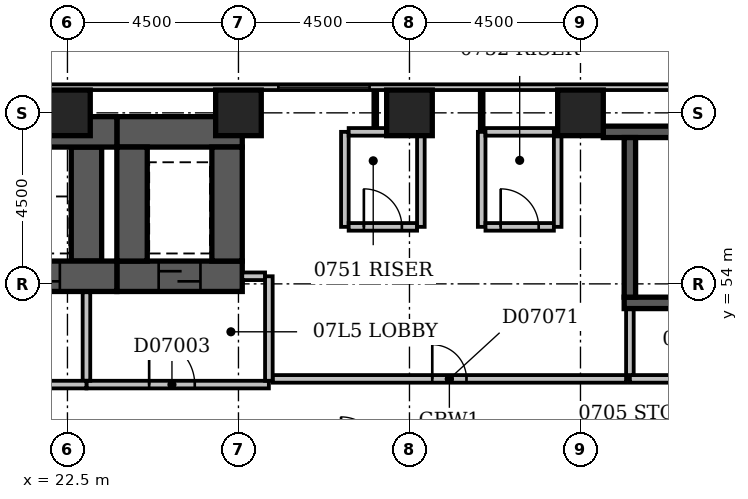
"""IFC4 building model, lengths in metres.
Left out: names, types, materials, properties, quantities, classifications, styles, units other than length and angle.
Written with IfcOpenShell. Run it as: python <this file> out.ifc"""

import sys

from ifc_helpers import new_model, si_unit, direction, frame, frame_2d, origin, origin_2d, place, context, subcontext, project, spatial, rectangle, extrude, element, fill, save


model = new_model("IFC4")
c1 = context("Model", 3, precision=1e-05, world=origin(), true_north=direction((0.0, 1.0)))
c2 = subcontext(c1, "Body", "Model", "MODEL_VIEW")
j1 = project(units=[si_unit("LENGTHUNIT", "METRE"), si_unit("PLANEANGLEUNIT", "RADIAN")], contexts=[c1])
p1 = place(None, origin())
s1 = spatial("IfcSite", under=j1, at=p1, CompositionType="ELEMENT")
p2 = place(p1, origin())
s2 = spatial("IfcBuilding", under=s1, at=p2, CompositionType="ELEMENT")
p3 = place(p2, frame((0.0, 0.0, 36.2)))
s3 = spatial("IfcBuildingStorey", under=s2, at=p3, CompositionType="ELEMENT", Elevation=36.2)
p4 = place(p3, frame((7.35, 54.2, -0.3), z_axis=(0.0, 0.0, 1.0), x_axis=(1.0, 0.0, 0.0)))
e1 = element("IfcWall", 1, at=p4, inside=s3, PredefinedType="SHEAR", context=c2, shape_type="SweptSolid", body=[
    extrude(rectangle(XDim=16.45, YDim=0.8, at=frame_2d((8.225, 0.0))), origin(), (0.0, 0.0, 1.0), 3.6),
])
p5 = place(p4, frame((1.35, 0.0, 0.3)))
e2 = element("IfcOpeningElement", 2, at=p5, cuts=e1, PredefinedType="OPENING", context=c2, shape_type="SweptSolid", body=[
    extrude(rectangle(XDim=1.1, YDim=2.1, at=frame_2d((0.55, 1.05))), frame((0.0, 0.412, 0.0), z_axis=(0.0, -1.0, 0.0), x_axis=(1.0, 0.0, 0.0)), (0.0, 0.0, 1.0), 0.824),
])
p6 = place(p4, frame((3.85, 0.0, 0.3)))
e3 = element("IfcOpeningElement", 3, at=p6, cuts=e1, PredefinedType="OPENING", context=c2, shape_type="SweptSolid", body=[
    extrude(rectangle(XDim=1.1, YDim=2.1, at=frame_2d((0.55, 1.05))), frame((0.0, 0.412, 0.0), z_axis=(0.0, -1.0, 0.0), x_axis=(1.0, 0.0, 0.0)), (0.0, 0.0, 1.0), 0.824),
])
p7 = place(p4, frame((6.35, 0.0, 0.3)))
e4 = element("IfcOpeningElement", 4, at=p7, cuts=e1, PredefinedType="OPENING", context=c2, shape_type="SweptSolid", body=[
    extrude(rectangle(XDim=1.1, YDim=2.1, at=frame_2d((0.55, 1.05))), frame((0.0, 0.412, 0.0), z_axis=(0.0, -1.0, 0.0), x_axis=(1.0, 0.0, 0.0)), (0.0, 0.0, 1.0), 0.824),
])
p8 = place(p4, frame((8.85, 0.0, 0.3)))
e5 = element("IfcOpeningElement", 5, at=p8, cuts=e1, PredefinedType="OPENING", context=c2, shape_type="SweptSolid", body=[
    extrude(rectangle(XDim=1.1, YDim=2.1, at=frame_2d((0.55, 1.05))), frame((0.0, 0.412, 0.0), z_axis=(0.0, -1.0, 0.0), x_axis=(1.0, 0.0, 0.0)), (0.0, 0.0, 1.0), 0.824),
])
p9 = place(p4, frame((11.35, 0.0, 0.3)))
e6 = element("IfcOpeningElement", 6, at=p9, cuts=e1, PredefinedType="OPENING", context=c2, shape_type="SweptSolid", body=[
    extrude(rectangle(XDim=1.1, YDim=2.1, at=frame_2d((0.55, 1.05))), frame((0.0, 0.412, 0.0), z_axis=(0.0, -1.0, 0.0), x_axis=(1.0, 0.0, 0.0)), (0.0, 0.0, 1.0), 0.824),
])
p10 = place(p4, frame((13.85, 0.0, 0.3)))
e7 = element("IfcOpeningElement", 7, at=p10, cuts=e1, PredefinedType="OPENING", context=c2, shape_type="SweptSolid", body=[
    extrude(rectangle(XDim=1.1, YDim=2.1, at=frame_2d((0.55, 1.05))), frame((0.0, 0.412, 0.0), z_axis=(0.0, -1.0, 0.0), x_axis=(1.0, 0.0, 0.0)), (0.0, 0.0, 1.0), 0.824),
])
p11 = place(p3, frame((7.35, 58.0, -0.3), z_axis=(0.0, 0.0, 1.0), x_axis=(1.0, 0.0, 0.0)))
e8 = element("IfcWall", 8, at=p11, inside=s3, PredefinedType="SHEAR", context=c2, shape_type="SweptSolid", body=[
    extrude(rectangle(XDim=16.45, YDim=0.8, at=frame_2d((8.225, 0.0))), origin(), (0.0, 0.0, 1.0), 3.6),
])
p12 = place(p3, frame((23.0, 54.6, -0.3), z_axis=(0.0, 0.0, 1.0), x_axis=(0.0, 1.0, 0.0)))
e9 = element("IfcWall", 9, at=p12, inside=s3, PredefinedType="SHEAR", context=c2, shape_type="SweptSolid", body=[
    extrude(rectangle(XDim=3.0, YDim=0.8, at=frame_2d((1.5, 0.0))), origin(), (0.0, 0.0, 1.0), 3.6),
])
p13 = place(p3, frame((23.8, 54.2, -0.3), z_axis=(0.0, 0.0, 1.0), x_axis=(1.0, 0.0, 0.0)))
e10 = element("IfcWall", 10, at=p13, inside=s3, PredefinedType="SHEAR", context=c2, shape_type="SweptSolid", body=[
    extrude(rectangle(XDim=3.3, YDim=0.8, at=frame_2d((1.65, 0.0))), origin(), (0.0, 0.0, 1.0), 3.6),
])
p14 = place(p13, frame((1.1, 0.0, 0.3)))
e11 = element("IfcOpeningElement", 11, at=p14, cuts=e10, PredefinedType="OPENING", context=c2, shape_type="SweptSolid", body=[
    extrude(rectangle(XDim=1.1, YDim=2.1, at=frame_2d((0.55, 1.05))), frame((0.0, 0.412, 0.0), z_axis=(0.0, -1.0, 0.0), x_axis=(1.0, 0.0, 0.0)), (0.0, 0.0, 1.0), 0.824),
])
p15 = place(p3, frame((23.8, 58.0, -0.3), z_axis=(0.0, 0.0, 1.0), x_axis=(1.0, 0.0, 0.0)))
e12 = element("IfcWall", 12, at=p15, inside=s3, PredefinedType="SHEAR", context=c2, shape_type="SweptSolid", body=[
    extrude(rectangle(XDim=3.3, YDim=0.8, at=frame_2d((1.65, 0.0))), origin(), (0.0, 0.0, 1.0), 3.6),
])
for number, where, z_axis, x_axis in (
    (13, (24.2, 54.6, -0.3), (0.0, 0.0, 1.0), (0.0, 1.0, 0.0)),
    (14, (26.7, 54.6, -0.3), (0.0, 0.0, 1.0), (0.0, 1.0, 0.0)),
):
    element("IfcWall", number, at=place(p3, frame(where, z_axis=z_axis, x_axis=x_axis)), inside=s3, PredefinedType="SHEAR", context=c2, shape_type="SweptSolid", body=[
        extrude(rectangle(XDim=3.0, YDim=0.8, at=frame_2d((1.5, 0.0))), origin(), (0.0, 0.0, 1.0), 3.6),
    ])
p16 = place(p3, frame((36.6, 58.0, -0.3), z_axis=(0.0, 0.0, 1.0), x_axis=(1.0, 0.0, 0.0)))
e15 = element("IfcWall", 15, at=p16, inside=s3, PredefinedType="SHEAR", context=c2, shape_type="SweptSolid", body=[
    extrude(rectangle(XDim=7.8, YDim=0.3, at=frame_2d((3.9, 0.0))), origin(), (0.0, 0.0, 1.0), 3.6),
])
p17 = place(p3, frame((37.15, 53.5, -0.3), z_axis=(0.0, 0.0, 1.0), x_axis=(1.0, 0.0, 0.0)))
e16 = element("IfcWall", 16, at=p17, inside=s3, PredefinedType="SHEAR", context=c2, shape_type="SweptSolid", body=[
    extrude(rectangle(XDim=7.0, YDim=0.3, at=frame_2d((3.5, 0.0))), origin(), (0.0, 0.0, 1.0), 3.6),
])
p18 = place(p17, frame((5.58, 0.0, 0.3)))
e17 = element("IfcOpeningElement", 17, at=p18, cuts=e16, PredefinedType="OPENING", context=c2, shape_type="SweptSolid", body=[
    extrude(rectangle(XDim=1.1, YDim=2.1, at=frame_2d((0.55, 1.05))), frame((0.0, 0.162, 0.0), z_axis=(0.0, -1.0, 0.0), x_axis=(1.0, 0.0, 0.0)), (0.0, 0.0, 1.0), 0.324),
])
p19 = place(p3, frame((37.3, 53.65, -0.3), z_axis=(0.0, 0.0, 1.0), x_axis=(0.0, 1.0, 0.0)))
e18 = element("IfcWall", 18, at=p19, inside=s3, PredefinedType="SHEAR", context=c2, shape_type="SweptSolid", body=[
    extrude(rectangle(XDim=4.2, YDim=0.3, at=frame_2d((2.1, 0.0))), origin(), (0.0, 0.0, 1.0), 3.6),
])
for number, where, z_axis, x_axis in (
    (19, (22.5, 58.5, -0.3), (0.0, 0.0, 1.0), (1.0, 0.0, 0.0)),
    (20, (27.0, 58.5, -0.3), (0.0, 0.0, 1.0), (1.0, 0.0, 0.0)),
    (21, (31.5, 58.5, -0.3), (0.0, 0.0, 1.0), (1.0, 0.0, 0.0)),
    (22, (36.0, 58.5, -0.3), (0.0, 0.0, 1.0), (1.0, 0.0, 0.0)),
):
    element("IfcColumn", number, at=place(p3, frame(where, z_axis=z_axis, x_axis=x_axis)), inside=s3, PredefinedType="COLUMN", context=c2, shape_type="SweptSolid", body=[
        extrude(rectangle(XDim=1.2, YDim=1.2, at=origin_2d()), origin(), (0.0, 0.0, 1.0), 3.6),
    ])
p20 = place(p3, frame((68.1, 59.175, 0.0), z_axis=(0.0, 0.0, 1.0), x_axis=(-1.0, 0.0, 0.0)))
e23 = element("IfcWall", 23, at=p20, inside=s3, PredefinedType="STANDARD", context=c2, shape_type="SweptSolid", body=[
    extrude(rectangle(XDim=68.85, YDim=0.15, at=frame_2d((34.425, 0.0))), origin(), (0.0, 0.0, 1.0), 2.7),
])
p21 = place(p20, frame((1.65, 0.0, 0.6)))
e24 = element("IfcOpeningElement", 24, at=p21, cuts=e23, PredefinedType="OPENING", context=c2, shape_type="SweptSolid", body=[
    extrude(rectangle(XDim=2.4, YDim=1.8, at=frame_2d((1.2, 0.9))), frame((0.0, 0.087, 0.0), z_axis=(0.0, -1.0, 0.0), x_axis=(1.0, 0.0, 0.0)), (0.0, 0.0, 1.0), 0.174),
])
p22 = place(p20, frame((6.023, 0.0, 0.6)))
e25 = element("IfcOpeningElement", 25, at=p22, cuts=e23, PredefinedType="OPENING", context=c2, shape_type="SweptSolid", body=[
    extrude(rectangle(XDim=1.2, YDim=1.8, at=frame_2d((0.6, 0.9))), frame((0.0, 0.087, 0.0), z_axis=(0.0, -1.0, 0.0), x_axis=(1.0, 0.0, 0.0)), (0.0, 0.0, 1.0), 0.174),
])
p23 = place(p20, frame((37.65, 0.0, 0.6)))
e26 = element("IfcOpeningElement", 26, at=p23, cuts=e23, PredefinedType="OPENING", context=c2, shape_type="SweptSolid", body=[
    extrude(rectangle(XDim=2.4, YDim=1.8, at=frame_2d((1.2, 0.9))), frame((0.0, 0.087, 0.0), z_axis=(0.0, -1.0, 0.0), x_axis=(1.0, 0.0, 0.0)), (0.0, 0.0, 1.0), 0.174),
])
p24 = place(p3, frame((8.0, 51.35, 0.0), z_axis=(0.0, 0.0, 1.0), x_axis=(1.0, 0.0, 0.0)))
e27 = element("IfcWall", 27, at=p24, inside=s3, PredefinedType="PARTITIONING", context=c2, shape_type="SweptSolid", body=[
    extrude(rectangle(XDim=15.0, YDim=0.2, at=frame_2d((7.5, 0.0))), origin(), (0.0, 0.0, 1.0), 3.3),
])
p25 = place(p24, frame((3.4, 0.0, 0.0)))
e28 = element("IfcOpeningElement", 28, at=p25, cuts=e27, PredefinedType="OPENING", context=c2, shape_type="SweptSolid", body=[
    extrude(rectangle(XDim=1.2, YDim=2.1, at=frame_2d((0.6, 1.05))), frame((0.0, 0.112, 0.0), z_axis=(0.0, -1.0, 0.0), x_axis=(1.0, 0.0, 0.0)), (0.0, 0.0, 1.0), 0.224),
])
p26 = place(p24, frame((9.4, 0.0, 0.0)))
e29 = element("IfcOpeningElement", 29, at=p26, cuts=e27, PredefinedType="OPENING", context=c2, shape_type="SweptSolid", body=[
    extrude(rectangle(XDim=1.2, YDim=2.1, at=frame_2d((0.6, 1.05))), frame((0.0, 0.112, 0.0), z_axis=(0.0, -1.0, 0.0), x_axis=(1.0, 0.0, 0.0)), (0.0, 0.0, 1.0), 0.224),
])
p27 = place(p3, frame((23.0, 51.45, 0.0), z_axis=(0.0, 0.0, 1.0), x_axis=(0.0, 1.0, 0.0)))
e30 = element("IfcWall", 30, at=p27, inside=s3, PredefinedType="PARTITIONING", context=c2, shape_type="SweptSolid", body=[
    extrude(rectangle(XDim=2.33, YDim=0.2, at=frame_2d((1.165, 0.0))), origin(), (0.0, 0.0, 1.0), 3.3),
])
p28 = place(p3, frame((23.0, 51.35, 0.0), z_axis=(0.0, 0.0, 1.0), x_axis=(1.0, 0.0, 0.0)))
e31 = element("IfcWall", 31, at=p28, inside=s3, PredefinedType="PARTITIONING", context=c2, shape_type="SweptSolid", body=[
    extrude(rectangle(XDim=4.8, YDim=0.2, at=frame_2d((2.4, 0.0))), origin(), (0.0, 0.0, 1.0), 3.3),
])
p29 = place(p28, frame((1.65, 0.0, 0.0)))
e32 = element("IfcOpeningElement", 32, at=p29, cuts=e31, PredefinedType="OPENING", context=c2, shape_type="SweptSolid", body=[
    extrude(rectangle(XDim=1.2, YDim=2.1, at=frame_2d((0.6, 1.05))), frame((0.0, 0.112, 0.0), z_axis=(0.0, -1.0, 0.0), x_axis=(1.0, 0.0, 0.0)), (0.0, 0.0, 1.0), 0.224),
])
p30 = place(p3, frame((27.8, 51.45, 0.0), z_axis=(0.0, 0.0, 1.0), x_axis=(0.0, 1.0, 0.0)))
e33 = element("IfcWall", 33, at=p30, inside=s3, PredefinedType="PARTITIONING", context=c2, shape_type="SweptSolid", body=[
    extrude(rectangle(XDim=2.75, YDim=0.2, at=frame_2d((1.375, 0.0))), origin(), (0.0, 0.0, 1.0), 3.3),
])
p31 = place(p3, frame((27.1, 54.2, 0.0), z_axis=(0.0, 0.0, 1.0), x_axis=(1.0, 0.0, 0.0)))
e34 = element("IfcWall", 34, at=p31, inside=s3, PredefinedType="PARTITIONING", context=c2, shape_type="SweptSolid", body=[
    extrude(rectangle(XDim=0.6, YDim=0.2, at=frame_2d((0.3, 0.0))), origin(), (0.0, 0.0, 1.0), 3.3),
])
p32 = place(p3, frame((37.3, 51.5, 0.0), z_axis=(0.0, 0.0, 1.0), x_axis=(1.0, 0.0, 0.0)))
e35 = element("IfcWall", 35, at=p32, inside=s3, PredefinedType="PARTITIONING", context=c2, shape_type="SweptSolid", body=[
    extrude(rectangle(XDim=6.7, YDim=0.2, at=frame_2d((3.35, 0.0))), origin(), (0.0, 0.0, 1.0), 3.3),
])
p33 = place(p32, frame((2.75, 0.0, 0.0)))
e36 = element("IfcOpeningElement", 36, at=p33, cuts=e35, PredefinedType="OPENING", context=c2, shape_type="SweptSolid", body=[
    extrude(rectangle(XDim=1.2, YDim=2.1, at=frame_2d((0.6, 1.05))), frame((0.0, 0.112, 0.0), z_axis=(0.0, -1.0, 0.0), x_axis=(1.0, 0.0, 0.0)), (0.0, 0.0, 1.0), 0.224),
])
p34 = place(p3, frame((37.3, 51.6, 0.0), z_axis=(0.0, 0.0, 1.0), x_axis=(0.0, 1.0, 0.0)))
e37 = element("IfcWall", 37, at=p34, inside=s3, PredefinedType="PARTITIONING", context=c2, shape_type="SweptSolid", body=[
    extrude(rectangle(XDim=1.73, YDim=0.2, at=frame_2d((0.865, 0.0))), origin(), (0.0, 0.0, 1.0), 3.3),
])
p35 = place(p3, frame((27.9, 51.5, 0.0), z_axis=(0.0, 0.0, 1.0), x_axis=(1.0, 0.0, 0.0)))
e38 = element("IfcWall", 38, at=p35, inside=s3, PredefinedType="PARTITIONING", context=c2, shape_type="SweptSolid", body=[
    extrude(rectangle(XDim=9.3, YDim=0.2, at=frame_2d((4.65, 0.0))), origin(), (0.0, 0.0, 1.0), 3.3),
])
p36 = place(p35, frame((4.2, 0.0, 0.0)))
e39 = element("IfcOpeningElement", 39, at=p36, cuts=e38, PredefinedType="OPENING", context=c2, shape_type="SweptSolid", body=[
    extrude(rectangle(XDim=0.9, YDim=2.1, at=frame_2d((0.45, 1.05))), frame((0.0, 0.112, 0.0), z_axis=(0.0, -1.0, 0.0), x_axis=(1.0, 0.0, 0.0)), (0.0, 0.0, 1.0), 0.224),
])
p37 = place(p3, frame((29.8, 55.5, 0.0), z_axis=(0.0, 0.0, 1.0), x_axis=(0.0, 1.0, 0.0)))
e40 = element("IfcWall", 40, at=p37, inside=s3, PredefinedType="PARTITIONING", context=c2, shape_type="SweptSolid", body=[
    extrude(rectangle(XDim=2.5, YDim=0.2, at=frame_2d((1.25, 0.0))), origin(), (0.0, 0.0, 1.0), 3.3),
])
p38 = place(p3, frame((29.9, 55.5, 0.0), z_axis=(0.0, 0.0, 1.0), x_axis=(1.0, 0.0, 0.0)))
e41 = element("IfcWall", 41, at=p38, inside=s3, PredefinedType="PARTITIONING", context=c2, shape_type="SweptSolid", body=[
    extrude(rectangle(XDim=1.8, YDim=0.2, at=frame_2d((0.9, 0.0))), origin(), (0.0, 0.0, 1.0), 3.3),
])
p39 = place(p38, frame((0.4, 0.0, 0.0)))
e42 = element("IfcOpeningElement", 42, at=p39, cuts=e41, PredefinedType="OPENING", context=c2, shape_type="SweptSolid", body=[
    extrude(rectangle(XDim=1.0, YDim=2.1, at=frame_2d((0.5, 1.05))), frame((0.0, 0.112, 0.0), z_axis=(0.0, -1.0, 0.0), x_axis=(1.0, 0.0, 0.0)), (0.0, 0.0, 1.0), 0.224),
])
for number, where, z_axis, x_axis in (
    (43, (31.8, 55.5, 0.0), (0.0, 0.0, 1.0), (0.0, 1.0, 0.0)),
    (44, (33.4, 55.5, 0.0), (0.0, 0.0, 1.0), (0.0, 1.0, 0.0)),
):
    element("IfcWall", number, at=place(p3, frame(where, z_axis=z_axis, x_axis=x_axis)), inside=s3, PredefinedType="PARTITIONING", context=c2, shape_type="SweptSolid", body=[
        extrude(rectangle(XDim=2.5, YDim=0.2, at=frame_2d((1.25, 0.0))), origin(), (0.0, 0.0, 1.0), 3.3),
    ])
p40 = place(p3, frame((33.5, 55.5, 0.0), z_axis=(0.0, 0.0, 1.0), x_axis=(1.0, 0.0, 0.0)))
e45 = element("IfcWall", 45, at=p40, inside=s3, PredefinedType="PARTITIONING", context=c2, shape_type="SweptSolid", body=[
    extrude(rectangle(XDim=1.8, YDim=0.2, at=frame_2d((0.9, 0.0))), origin(), (0.0, 0.0, 1.0), 3.3),
])
p41 = place(p40, frame((0.4, 0.0, 0.0)))
e46 = element("IfcOpeningElement", 46, at=p41, cuts=e45, PredefinedType="OPENING", context=c2, shape_type="SweptSolid", body=[
    extrude(rectangle(XDim=1.0, YDim=2.1, at=frame_2d((0.5, 1.05))), frame((0.0, 0.112, 0.0), z_axis=(0.0, -1.0, 0.0), x_axis=(1.0, 0.0, 0.0)), (0.0, 0.0, 1.0), 0.224),
])
p42 = place(p3, frame((35.4, 55.5, 0.0), z_axis=(0.0, 0.0, 1.0), x_axis=(0.0, 1.0, 0.0)))
e47 = element("IfcWall", 47, at=p42, inside=s3, PredefinedType="PARTITIONING", context=c2, shape_type="SweptSolid", body=[
    extrude(rectangle(XDim=2.5, YDim=0.2, at=frame_2d((1.25, 0.0))), origin(), (0.0, 0.0, 1.0), 2.4),
])
p43 = place(p3, frame((29.9, 58.0, 0.0), z_axis=(0.0, 0.0, 1.0), x_axis=(1.0, 0.0, 0.0)))
e48 = element("IfcWall", 48, at=p43, inside=s3, PredefinedType="PARTITIONING", context=c2, shape_type="SweptSolid", body=[
    extrude(rectangle(XDim=1.8, YDim=0.2, at=frame_2d((0.9, 0.0))), origin(), (0.0, 0.0, 1.0), 3.3),
])
p44 = place(p3, frame((33.4, 58.0, 0.0), z_axis=(0.0, 0.0, 1.0), x_axis=(0.0, 1.0, 0.0)))
e49 = element("IfcWall", 49, at=p44, inside=s3, PredefinedType="PARTITIONING", context=c2, shape_type="SweptSolid", body=[
    extrude(rectangle(XDim=1.1, YDim=0.1, at=frame_2d((0.55, 0.0))), origin(), (0.0, 0.0, 1.0), 3.3),
])
p45 = place(p3, frame((33.5, 58.0, 0.0), z_axis=(0.0, 0.0, 1.0), x_axis=(1.0, 0.0, 0.0)))
e50 = element("IfcWall", 50, at=p45, inside=s3, PredefinedType="PARTITIONING", context=c2, shape_type="SweptSolid", body=[
    extrude(rectangle(XDim=1.8, YDim=0.2, at=frame_2d((0.9, 0.0))), origin(), (0.0, 0.0, 1.0), 3.3),
])
p46 = place(p3, frame((30.6, 58.1, 0.0), z_axis=(0.0, 0.0, 1.0), x_axis=(0.0, 1.0, 0.0)))
e51 = element("IfcWall", 51, at=p46, inside=s3, PredefinedType="PARTITIONING", context=c2, shape_type="SweptSolid", body=[
    extrude(rectangle(XDim=1.0, YDim=0.1, at=frame_2d((0.5, 0.0))), origin(), (0.0, 0.0, 1.0), 3.3),
])
p47 = place(p23, origin())
e52 = element("IfcWindow", 52, at=p47, inside=s3, PartitioningType="SINGLE_PANEL", PredefinedType="WINDOW", context=c2, shape_type="SweptSolid", body=[
    extrude(rectangle(XDim=2.4, YDim=1.8, at=frame_2d((1.2, 0.9))), frame((0.0, 0.03, 0.0), z_axis=(0.0, -1.0, 0.0), x_axis=(1.0, 0.0, 0.0)), (0.0, 0.0, 1.0), 0.06),
])
fill(e26, e52)
p48 = place(p29, origin())
e53 = element("IfcDoor", 53, at=p48, inside=s3, OperationType="SINGLE_SWING_LEFT", PredefinedType="DOOR", context=c2, shape_type="SweptSolid", body=[
    extrude(rectangle(XDim=1.2, YDim=2.1, at=frame_2d((0.6, 1.05))), frame((0.0, 0.025, 0.0), z_axis=(0.0, -1.0, 0.0), x_axis=(1.0, 0.0, 0.0)), (0.0, 0.0, 1.0), 0.05),
])
fill(e32, e53)
p49 = place(p14, origin())
e54 = element("IfcDoor", 54, at=p49, inside=s3, OperationType="SLIDING_TO_LEFT", PredefinedType="DOOR", context=c2, shape_type="SweptSolid", body=[
    extrude(rectangle(XDim=1.1, YDim=2.1, at=frame_2d((0.55, 1.05))), frame((0.0, 0.025, 0.0), z_axis=(0.0, -1.0, 0.0), x_axis=(1.0, 0.0, 0.0)), (0.0, 0.0, 1.0), 0.05),
])
fill(e11, e54)
p50 = place(p10, origin())
e55 = element("IfcDoor", 55, at=p50, inside=s3, OperationType="SLIDING_TO_LEFT", PredefinedType="DOOR", context=c2, shape_type="SweptSolid", body=[
    extrude(rectangle(XDim=1.1, YDim=2.1, at=frame_2d((0.55, 1.05))), frame((0.0, 0.025, 0.0), z_axis=(0.0, -1.0, 0.0), x_axis=(1.0, 0.0, 0.0)), (0.0, 0.0, 1.0), 0.05),
])
fill(e7, e55)
p51 = place(p36, origin())
e56 = element("IfcDoor", 56, at=p51, inside=s3, OperationType="SINGLE_SWING_LEFT", PredefinedType="DOOR", context=c2, shape_type="SweptSolid", body=[
    extrude(rectangle(XDim=0.9, YDim=2.1, at=frame_2d((0.45, 1.05))), frame((0.0, 0.025, 0.0), z_axis=(0.0, -1.0, 0.0), x_axis=(1.0, 0.0, 0.0)), (0.0, 0.0, 1.0), 0.05),
])
fill(e39, e56)
p52 = place(p39, origin())
e57 = element("IfcDoor", 57, at=p52, inside=s3, OperationType="SINGLE_SWING_LEFT", PredefinedType="DOOR", context=c2, shape_type="SweptSolid", body=[
    extrude(rectangle(XDim=1.0, YDim=2.1, at=frame_2d((0.5, 1.05))), frame((0.0, 0.025, 0.0), z_axis=(0.0, -1.0, 0.0), x_axis=(1.0, 0.0, 0.0)), (0.0, 0.0, 1.0), 0.05),
])
fill(e42, e57)
p53 = place(p41, origin())
e58 = element("IfcDoor", 58, at=p53, inside=s3, OperationType="SINGLE_SWING_LEFT", PredefinedType="DOOR", context=c2, shape_type="SweptSolid", body=[
    extrude(rectangle(XDim=1.0, YDim=2.1, at=frame_2d((0.5, 1.05))), frame((0.0, 0.025, 0.0), z_axis=(0.0, -1.0, 0.0), x_axis=(1.0, 0.0, 0.0)), (0.0, 0.0, 1.0), 0.05),
])
fill(e46, e58)
save(model, sys.argv[1])
